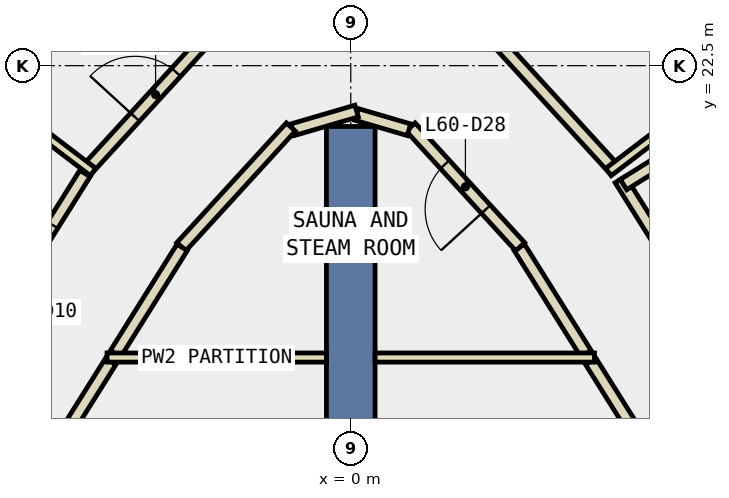
"""IFC4 building model, lengths in metres.
Left out: names, types, materials, properties, quantities, classifications, styles, units other than length and angle.
Written with IfcOpenShell. Run it as: python <this file> out.ifc"""

import sys

from ifc_helpers import new_model, si_unit, direction, frame, frame_2d, origin, place, context, subcontext, project, spatial, rectangle, extrude, element, fill, save


model = new_model("IFC4")
c1 = context("Model", 3, precision=1e-05, world=origin(), true_north=direction((0.0, 1.0)))
c2 = subcontext(c1, "Body", "Model", "MODEL_VIEW")
j1 = project(units=[si_unit("LENGTHUNIT", "METRE"), si_unit("PLANEANGLEUNIT", "RADIAN")], contexts=[c1])
p1 = place(None, origin())
s1 = spatial("IfcSite", under=j1, at=p1, CompositionType="ELEMENT")
p2 = place(p1, origin())
s2 = spatial("IfcBuilding", under=s1, at=p2, CompositionType="ELEMENT")
p3 = place(p2, frame((0.0, 0.0, 263.0)))
s3 = spatial("IfcBuildingStorey", under=s2, at=p3, CompositionType="ELEMENT", Elevation=263.0)
p4 = place(p3, frame((0.0, 12.5, -0.34), z_axis=(0.0, 0.0, 1.0), x_axis=(0.0, 1.0, 0.0)))
e1 = element("IfcWall", 1, at=p4, inside=s3, PredefinedType="SHEAR", context=c2, shape_type="SweptSolid", body=[
    extrude(rectangle(XDim=9.0, YDim=0.8, at=frame_2d((4.5, 0.0))), origin(), (0.0, 0.0, 1.0), 3.6),
])
for number, where, z_axis, x_axis in (
    (2, (5.863, 14.583, 0.0), (0.0, 0.0, 1.0), (-0.531, 0.847, 0.0)),
    (3, (-3.948, 17.636, 0.0), (0.0, 0.0, 1.0), (-0.531, -0.847, 0.0)),
):
    element("IfcWall", number, at=place(p3, frame(where, z_axis=z_axis, x_axis=x_axis)), inside=s3, PredefinedType="PARTITIONING", context=c2, shape_type="SweptSolid", body=[
        extrude(rectangle(XDim=3.604, YDim=0.2, at=frame_2d((1.802, 0.0))), origin(), (0.0, 0.0, 1.0), 3.26),
    ])
p5 = place(p3, frame((3.868, 17.764, 0.0), z_axis=(0.0, 0.0, 1.0), x_axis=(-0.531062870102, 0.847332418829, 0.0)))
e4 = element("IfcWall", 4, at=p5, inside=s3, PredefinedType="PARTITIONING", context=c2, shape_type="SweptSolid", body=[
    extrude(rectangle(XDim=2.062, YDim=0.2, at=frame_2d((1.031, 0.0))), origin(), (0.0, 0.0, 1.0), 3.26),
])
p6 = place(p3, frame((2.787, 19.522, 0.0), z_axis=(0.0, 0.0, 1.0), x_axis=(-0.675132105979, 0.73769684795, 0.0)))
e5 = element("IfcWall", 5, at=p6, inside=s3, PredefinedType="PARTITIONING", context=c2, shape_type="SweptSolid", body=[
    extrude(rectangle(XDim=2.669, YDim=0.2, at=frame_2d((1.334, 0.0))), origin(), (0.0, 0.0, 1.0), 3.26),
])
p7 = place(p6, frame((0.835, 0.0, 0.0)))
e6 = element("IfcOpeningElement", 6, at=p7, cuts=e5, PredefinedType="OPENING", context=c2, shape_type="SweptSolid", body=[
    extrude(rectangle(XDim=1.0, YDim=2.1, at=frame_2d((0.5, 1.05))), frame((0.0, 0.11, 0.0), z_axis=(0.0, -1.0, 0.0), x_axis=(1.0, 0.0, 0.0)), (0.0, 0.0, 1.0), 0.22),
])
p8 = place(p3, frame((0.957, 21.446, 0.0), z_axis=(0.0, 0.0, 1.0), x_axis=(-0.959758875404, 0.28082539252, 0.0)))
e7 = element("IfcWall", 7, at=p8, inside=s3, PredefinedType="PARTITIONING", context=c2, shape_type="SweptSolid", body=[
    extrude(rectangle(XDim=0.897, YDim=0.2, at=frame_2d((0.449, 0.0))), origin(), (0.0, 0.0, 1.0), 3.26),
])
p9 = place(p3, frame((0.096, 21.754, 0.0), z_axis=(0.0, 0.0, 1.0), x_axis=(-0.959817848073, -0.280623766849, 0.0)))
e8 = element("IfcWall", 8, at=p9, inside=s3, PredefinedType="PARTITIONING", context=c2, shape_type="SweptSolid", body=[
    extrude(rectangle(XDim=1.097, YDim=0.2, at=frame_2d((0.549, 0.0))), origin(), (0.0, 0.0, 1.0), 3.26),
])
p10 = place(p3, frame((-0.985, 21.491, 0.0), z_axis=(0.0, 0.0, 1.0), x_axis=(-0.675132105979, -0.73769684795, 0.0)))
e9 = element("IfcWall", 9, at=p10, inside=s3, PredefinedType="PARTITIONING", context=c2, shape_type="SweptSolid", body=[
    extrude(rectangle(XDim=2.669, YDim=0.2, at=frame_2d((1.334, 0.0))), origin(), (0.0, 0.0, 1.0), 3.26),
])
p11 = place(p3, frame((-2.773, 19.511, 0.0), z_axis=(0.0, 0.0, 1.0), x_axis=(-0.531062870102, -0.847332418829, 0.0)))
e10 = element("IfcWall", 10, at=p11, inside=s3, PredefinedType="PARTITIONING", context=c2, shape_type="SweptSolid", body=[
    extrude(rectangle(XDim=2.062, YDim=0.2, at=frame_2d((1.031, 0.0))), origin(), (0.0, 0.0, 1.0), 3.26),
])
p12 = place(p3, frame((4.433, 20.628, 0.0), z_axis=(0.0, 0.0, 1.0), x_axis=(0.531135189756, -0.84728708842, 0.0)))
e11 = element("IfcWall", 11, at=p12, inside=s3, PredefinedType="PARTITIONING", context=c2, shape_type="SweptSolid", body=[
    extrude(rectangle(XDim=2.799, YDim=0.2, at=frame_2d((1.4, 0.0))), origin(), (0.0, 0.0, 1.0), 3.26),
])
p13 = place(p3, frame((-4.335, 20.793, 0.0), z_axis=(0.0, 0.0, 1.0), x_axis=(0.675074517272, 0.737749548377, 0.0)))
e12 = element("IfcWall", 12, at=p13, inside=s3, PredefinedType="PARTITIONING", context=c2, shape_type="SweptSolid", body=[
    extrude(rectangle(XDim=3.334, YDim=0.2, at=frame_2d((1.667, 0.0))), origin(), (0.0, 0.0, 1.0), 3.26),
])
p14 = place(p13, frame((1.167, 0.0, 0.0)))
e13 = element("IfcOpeningElement", 13, at=p14, cuts=e12, PredefinedType="OPENING", context=c2, shape_type="SweptSolid", body=[
    extrude(rectangle(XDim=1.0, YDim=2.1, at=frame_2d((0.5, 1.05))), frame((0.0, 0.11, 0.0), z_axis=(0.0, -1.0, 0.0), x_axis=(1.0, 0.0, 0.0)), (0.0, 0.0, 1.0), 0.22),
])
p15 = place(p3, frame((2.084, 23.253, 0.0), z_axis=(0.0, 0.0, 1.0), x_axis=(0.675074517272, -0.737749548377, 0.0)))
e14 = element("IfcWall", 14, at=p15, inside=s3, PredefinedType="PARTITIONING", context=c2, shape_type="SweptSolid", body=[
    extrude(rectangle(XDim=3.334, YDim=0.2, at=frame_2d((1.667, 0.0))), origin(), (0.0, 0.0, 1.0), 3.26),
])
p16 = place(p3, frame((-5.965, 18.185, 0.0), z_axis=(0.0, 0.0, 1.0), x_axis=(0.531256372055, 0.847211111324, 0.0)))
e15 = element("IfcWall", 15, at=p16, inside=s3, PredefinedType="PARTITIONING", context=c2, shape_type="SweptSolid", body=[
    extrude(rectangle(XDim=3.0, YDim=0.2, at=frame_2d((1.5, 0.0))), origin(), (0.0, 0.0, 1.0), 3.26),
])
p17 = place(p16, frame((1.0, 0.0, 0.0)))
e16 = element("IfcOpeningElement", 16, at=p17, cuts=e15, PredefinedType="OPENING", context=c2, shape_type="SweptSolid", body=[
    extrude(rectangle(XDim=1.0, YDim=2.1, at=frame_2d((0.5, 1.05))), frame((0.0, 0.11, 0.0), z_axis=(0.0, -1.0, 0.0), x_axis=(1.0, 0.0, 0.0)), (0.0, 0.0, 1.0), 0.22),
])
p18 = place(p3, frame((-4.008, 17.7, 0.0), z_axis=(0.0, 0.0, 1.0), x_axis=(1.0, 0.0, 0.0)))
e17 = element("IfcWall", 17, at=p18, inside=s3, PredefinedType="PARTITIONING", context=c2, shape_type="SweptSolid", body=[
    extrude(rectangle(XDim=3.608, YDim=0.15, at=frame_2d((1.804, 0.0))), origin(), (0.0, 0.0, 1.0), 3.26),
])
p19 = place(p3, frame((6.604, 21.871, 0.0), z_axis=(0.0, 0.0, 1.0), x_axis=(-0.847377617561, -0.530990746866, 0.0)))
e18 = element("IfcWall", 18, at=p19, inside=s3, PredefinedType="PARTITIONING", context=c2, shape_type="SweptSolid", body=[
    extrude(rectangle(XDim=2.499, YDim=0.2, at=frame_2d((1.25, 0.0))), origin(), (0.0, 0.0, 1.0), 3.26),
])
for number, where, z_axis, x_axis in (
    (19, (4.238, 20.751, 0.0), (0.0, 0.0, 1.0), (0.796, 0.606, 0.0)),
    (20, (-4.238, 20.751, 0.0), (0.0, 0.0, 1.0), (-0.796, 0.606, 0.0)),
):
    element("IfcWall", number, at=place(p3, frame(where, z_axis=z_axis, x_axis=x_axis)), inside=s3, PredefinedType="PARTITIONING", context=c2, shape_type="SweptSolid", body=[
        extrude(rectangle(XDim=4.604, YDim=0.15, at=frame_2d((2.302, 0.0))), origin(), (0.0, 0.0, 1.0), 3.26),
    ])
p20 = place(p3, frame((0.4, 17.7, 0.0), z_axis=(0.0, 0.0, 1.0), x_axis=(1.0, 0.0, 0.0)))
e21 = element("IfcWall", 21, at=p20, inside=s3, PredefinedType="PARTITIONING", context=c2, shape_type="SweptSolid", body=[
    extrude(rectangle(XDim=3.608, YDim=0.15, at=frame_2d((1.804, 0.0))), origin(), (0.0, 0.0, 1.0), 3.26),
])
p21 = place(p17, origin())
e22 = element("IfcDoor", 22, at=p21, inside=s3, OperationType="SINGLE_SWING_LEFT", PredefinedType="DOOR", context=c2, shape_type="SweptSolid", body=[
    extrude(rectangle(XDim=1.0, YDim=2.1, at=frame_2d((0.5, 1.05))), frame((0.0, 0.025, 0.0), z_axis=(0.0, -1.0, 0.0), x_axis=(1.0, 0.0, 0.0)), (0.0, 0.0, 1.0), 0.05),
])
fill(e16, e22)
p22 = place(p14, origin())
e23 = element("IfcDoor", 23, at=p22, inside=s3, OperationType="SINGLE_SWING_LEFT", PredefinedType="DOOR", context=c2, shape_type="SweptSolid", body=[
    extrude(rectangle(XDim=1.0, YDim=2.1, at=frame_2d((0.5, 1.05))), frame((0.0, 0.025, 0.0), z_axis=(0.0, -1.0, 0.0), x_axis=(1.0, 0.0, 0.0)), (0.0, 0.0, 1.0), 0.05),
])
fill(e13, e23)
p23 = place(p7, origin())
e24 = element("IfcDoor", 24, at=p23, inside=s3, OperationType="SINGLE_SWING_LEFT", PredefinedType="DOOR", context=c2, shape_type="SweptSolid", body=[
    extrude(rectangle(XDim=1.0, YDim=2.1, at=frame_2d((0.5, 1.05))), frame((0.0, 0.025, 0.0), z_axis=(0.0, -1.0, 0.0), x_axis=(1.0, 0.0, 0.0)), (0.0, 0.0, 1.0), 0.05),
])
fill(e6, e24)
save(model, sys.argv[1])
